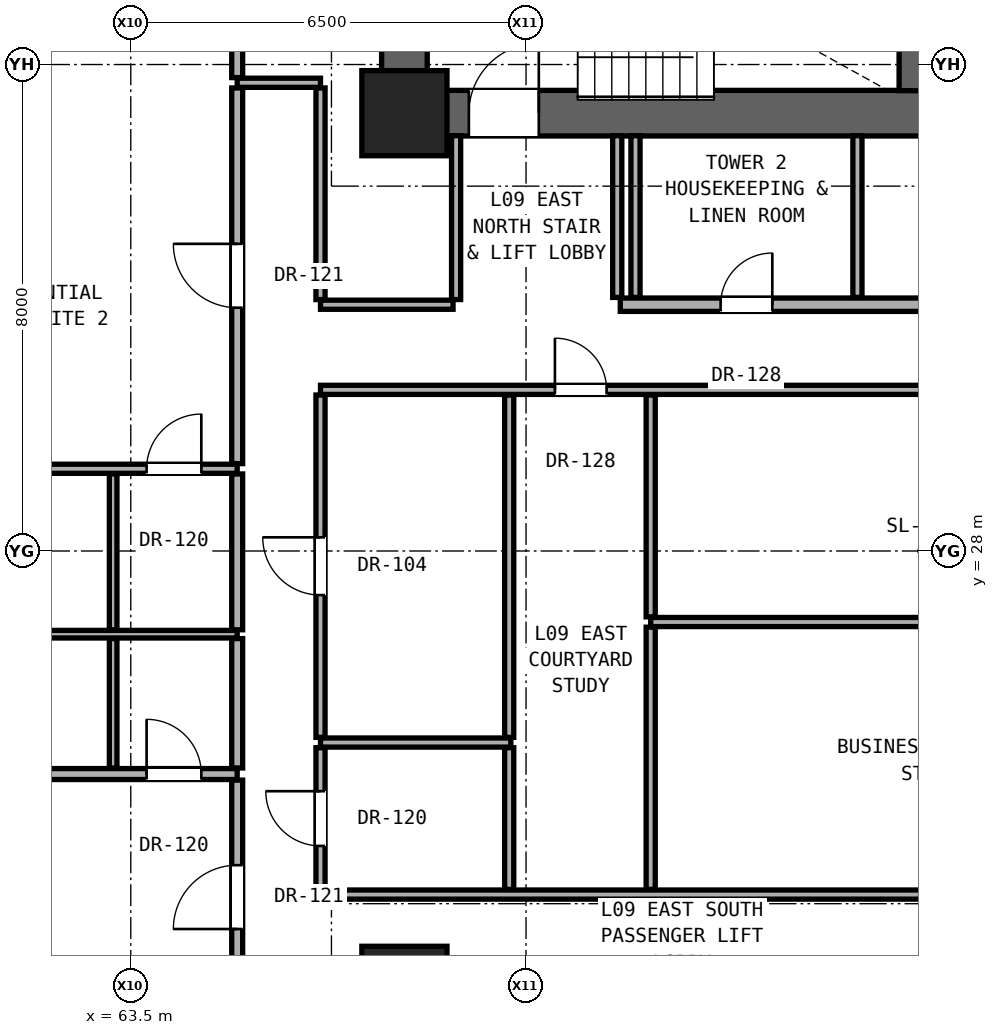
"""IFC4 building model, lengths in metres.
Left out: names, types, materials, properties, quantities, classifications, styles, units other than length and angle.
Written with IfcOpenShell. Run it as: python <this file> out.ifc"""

import sys

from ifc_helpers import new_model, si_unit, direction, frame, frame_2d, origin, origin_2d, place, context, subcontext, project, spatial, rectangle, extrude, element, fill, save


model = new_model("IFC4")
c1 = context("Model", 3, precision=1e-05, world=origin(), true_north=direction((0.0, 1.0)))
c2 = subcontext(c1, "Body", "Model", "MODEL_VIEW")
j1 = project(units=[si_unit("LENGTHUNIT", "METRE"), si_unit("PLANEANGLEUNIT", "RADIAN")], contexts=[c1])
p1 = place(None, origin())
s1 = spatial("IfcSite", under=j1, at=p1, CompositionType="ELEMENT")
p2 = place(p1, origin())
s2 = spatial("IfcBuilding", under=s1, at=p2, CompositionType="ELEMENT")
p3 = place(p2, frame((0.0, 0.0, 35.6)))
s3 = spatial("IfcBuildingStorey", under=s2, at=p3, CompositionType="ELEMENT", Elevation=35.6)
for number, where, z_axis, x_axis in (
    (1, (68.0, 20.8, 0.0), (0.0, 0.0, 1.0), (1.0, 0.0, 0.0)),
    (2, (68.0, 35.2, 0.0), (0.0, 0.0, 1.0), (1.0, 0.0, 0.0)),
):
    element("IfcColumn", number, at=place(p3, frame(where, z_axis=z_axis, x_axis=x_axis)), inside=s3, PredefinedType="COLUMN", context=c2, shape_type="SweptSolid", body=[
        extrude(rectangle(XDim=1.4, YDim=1.4, at=origin_2d()), origin(), (0.0, 0.0, 1.0), 3.3),
    ])
p4 = place(p3, frame((68.0, 35.2, 0.0), z_axis=(0.0, 0.0, 1.0), x_axis=(0.0, 1.0, 0.0)))
e3 = element("IfcWall", 3, at=p4, inside=s3, PredefinedType="SHEAR", context=c2, shape_type="SweptSolid", body=[
    extrude(rectangle(XDim=5.6, YDim=0.75, at=frame_2d((2.8, 0.0))), origin(), (0.0, 0.0, 1.0), 3.06),
])
p5 = place(p3, frame((68.0, 35.2, 0.0), z_axis=(0.0, 0.0, 1.0), x_axis=(1.0, 0.0, 0.0)))
e4 = element("IfcWall", 4, at=p5, inside=s3, PredefinedType="SHEAR", context=c2, shape_type="SweptSolid", body=[
    extrude(rectangle(XDim=17.0, YDim=0.75, at=frame_2d((8.5, 0.0))), origin(), (0.0, 0.0, 1.0), 3.06),
])
p6 = place(p5, frame((1.06, 0.0, 0.0)))
e5 = element("IfcOpeningElement", 5, at=p6, cuts=e4, PredefinedType="OPENING", context=c2, shape_type="SweptSolid", body=[
    extrude(rectangle(XDim=1.15, YDim=2.2, at=frame_2d((0.575, 1.1))), frame((0.0, 0.385, 0.0), z_axis=(0.0, -1.0, 0.0), x_axis=(1.0, 0.0, 0.0)), (0.0, 0.0, 1.0), 0.77),
])
p7 = place(p5, frame((8.75, 0.0, 0.0)))
e6 = element("IfcOpeningElement", 6, at=p7, cuts=e4, PredefinedType="OPENING", context=c2, shape_type="SweptSolid", body=[
    extrude(rectangle(XDim=1.4, YDim=2.35, at=frame_2d((0.7, 1.175))), frame((0.0, 0.385, 0.0), z_axis=(0.0, -1.0, 0.0), x_axis=(1.0, 0.0, 0.0)), (0.0, 0.0, 1.0), 0.77),
])
p8 = place(p5, frame((10.77, 0.0, 0.0)))
e7 = element("IfcOpeningElement", 7, at=p8, cuts=e4, PredefinedType="OPENING", context=c2, shape_type="SweptSolid", body=[
    extrude(rectangle(XDim=1.3, YDim=2.3, at=frame_2d((0.65, 1.15))), frame((0.0, 0.385, 0.0), z_axis=(0.0, -1.0, 0.0), x_axis=(1.0, 0.0, 0.0)), (0.0, 0.0, 1.0), 0.77),
])
p9 = place(p5, frame((12.69, 0.0, 0.0)))
e8 = element("IfcOpeningElement", 8, at=p9, cuts=e4, PredefinedType="OPENING", context=c2, shape_type="SweptSolid", body=[
    extrude(rectangle(XDim=1.3, YDim=2.3, at=frame_2d((0.65, 1.15))), frame((0.0, 0.385, 0.0), z_axis=(0.0, -1.0, 0.0), x_axis=(1.0, 0.0, 0.0)), (0.0, 0.0, 1.0), 0.77),
])
p10 = place(p5, frame((14.57, 0.0, 0.0)))
e9 = element("IfcOpeningElement", 9, at=p10, cuts=e4, PredefinedType="OPENING", context=c2, shape_type="SweptSolid", body=[
    extrude(rectangle(XDim=1.3, YDim=2.3, at=frame_2d((0.65, 1.15))), frame((0.0, 0.385, 0.0), z_axis=(0.0, -1.0, 0.0), x_axis=(1.0, 0.0, 0.0)), (0.0, 0.0, 1.0), 0.77),
])
p11 = place(p3, frame((66.62, 22.35, 0.0), z_axis=(0.0, 0.0, 1.0), x_axis=(1.0, 0.0, 0.0)))
e10 = element("IfcWall", 10, at=p11, inside=s3, PredefinedType="PARTITIONING", context=c2, shape_type="SweptSolid", body=[
    extrude(rectangle(XDim=19.63, YDim=0.15, at=frame_2d((9.815, 0.0))), origin(), (0.0, 0.0, 1.0), 2.125),
])
p12 = place(p11, frame((12.085, 0.0, 0.0)))
e11 = element("IfcOpeningElement", 11, at=p12, cuts=e10, PredefinedType="OPENING", context=c2, shape_type="SweptSolid", body=[
    extrude(rectangle(XDim=0.85, YDim=2.01, at=frame_2d((0.425, 1.005))), frame((0.0, 0.085, 0.0), z_axis=(0.0, -1.0, 0.0), x_axis=(1.0, 0.0, 0.0)), (0.0, 0.0, 1.0), 0.17),
])
p13 = place(p3, frame((57.768, 24.332, 0.0), z_axis=(0.0, 0.0, 1.0), x_axis=(1.0, 0.0, 0.0)))
e12 = element("IfcWall", 12, at=p13, inside=s3, PredefinedType="PARTITIONING", context=c2, shape_type="SweptSolid", body=[
    extrude(rectangle(XDim=7.482, YDim=0.18, at=frame_2d((3.741, 0.0))), origin(), (0.0, 0.0, 1.0), 2.196),
])
p14 = place(p13, frame((2.266, 0.0, 0.0)))
e13 = element("IfcOpeningElement", 13, at=p14, cuts=e12, PredefinedType="OPENING", context=c2, shape_type="SweptSolid", body=[
    extrude(rectangle(XDim=0.95, YDim=2.15, at=frame_2d((0.475, 1.075))), frame((0.0, 0.1, 0.0), z_axis=(0.0, -1.0, 0.0), x_axis=(1.0, 0.0, 0.0)), (0.0, 0.0, 1.0), 0.2),
])
p15 = place(p13, frame((5.992, 0.0, 0.0)))
e14 = element("IfcOpeningElement", 14, at=p15, cuts=e12, PredefinedType="OPENING", context=c2, shape_type="SweptSolid", body=[
    extrude(rectangle(XDim=0.9, YDim=2.1, at=frame_2d((0.45, 1.05))), frame((0.0, 0.1, 0.0), z_axis=(0.0, -1.0, 0.0), x_axis=(1.0, 0.0, 0.0)), (0.0, 0.0, 1.0), 0.2),
])
p16 = place(p3, frame((66.62, 24.85, 0.0), z_axis=(0.0, 0.0, 1.0), x_axis=(1.0, 0.0, 0.0)))
e15 = element("IfcWall", 15, at=p16, inside=s3, PredefinedType="PARTITIONING", context=c2, shape_type="SweptSolid", body=[
    extrude(rectangle(XDim=3.13, YDim=0.15, at=frame_2d((1.565, 0.0))), origin(), (0.0, 0.0, 1.0), 2.125),
])
p17 = place(p3, frame((57.768, 26.632, 0.0), z_axis=(0.0, 0.0, 1.0), x_axis=(1.0, 0.0, 0.0)))
e16 = element("IfcWall", 16, at=p17, inside=s3, PredefinedType="PARTITIONING", context=c2, shape_type="SweptSolid", body=[
    extrude(rectangle(XDim=7.482, YDim=0.125, at=frame_2d((3.741, 0.0))), origin(), (0.0, 0.0, 1.0), 2.196),
])
p18 = place(p3, frame((72.05, 26.832, 0.0), z_axis=(0.0, 0.0, 1.0), x_axis=(1.0, 0.0, 0.0)))
e17 = element("IfcWall", 17, at=p18, inside=s3, PredefinedType="PARTITIONING", context=c2, shape_type="SweptSolid", body=[
    extrude(rectangle(XDim=14.2, YDim=0.15, at=frame_2d((7.1, 0.0))), origin(), (0.0, 0.0, 1.0), 2.125),
])
p19 = place(p3, frame((57.768, 29.352, 0.0), z_axis=(0.0, 0.0, 1.0), x_axis=(1.0, 0.0, 0.0)))
e18 = element("IfcWall", 18, at=p19, inside=s3, PredefinedType="PARTITIONING", context=c2, shape_type="SweptSolid", body=[
    extrude(rectangle(XDim=7.482, YDim=0.15, at=frame_2d((3.741, 0.0))), origin(), (0.0, 0.0, 1.0), 2.196),
])
p20 = place(p19, frame((1.316, 0.0, 0.0)))
e19 = element("IfcOpeningElement", 19, at=p20, cuts=e18, PredefinedType="OPENING", context=c2, shape_type="SweptSolid", body=[
    extrude(rectangle(XDim=0.95, YDim=2.15, at=frame_2d((0.475, 1.075))), frame((0.0, 0.085, 0.0), z_axis=(0.0, -1.0, 0.0), x_axis=(1.0, 0.0, 0.0)), (0.0, 0.0, 1.0), 0.17),
])
p21 = place(p19, frame((5.992, 0.0, 0.0)))
e20 = element("IfcOpeningElement", 20, at=p21, cuts=e18, PredefinedType="OPENING", context=c2, shape_type="SweptSolid", body=[
    extrude(rectangle(XDim=0.9, YDim=2.1, at=frame_2d((0.45, 1.05))), frame((0.0, 0.085, 0.0), z_axis=(0.0, -1.0, 0.0), x_axis=(1.0, 0.0, 0.0)), (0.0, 0.0, 1.0), 0.17),
])
p22 = place(p3, frame((66.62, 30.65, 0.0), z_axis=(0.0, 0.0, 1.0), x_axis=(1.0, 0.0, 0.0)))
e21 = element("IfcWall", 21, at=p22, inside=s3, PredefinedType="PARTITIONING", context=c2, shape_type="SweptSolid", body=[
    extrude(rectangle(XDim=19.63, YDim=0.15, at=frame_2d((9.815, 0.0))), origin(), (0.0, 0.0, 1.0), 2.125),
])
p23 = place(p22, frame((3.855, 0.0, 0.0)))
e22 = element("IfcOpeningElement", 22, at=p23, cuts=e21, PredefinedType="OPENING", context=c2, shape_type="SweptSolid", body=[
    extrude(rectangle(XDim=0.85, YDim=2.01, at=frame_2d((0.425, 1.005))), frame((0.0, 0.085, 0.0), z_axis=(0.0, -1.0, 0.0), x_axis=(1.0, 0.0, 0.0)), (0.0, 0.0, 1.0), 0.17),
])
p24 = place(p22, frame((12.085, 0.0, 0.0)))
e23 = element("IfcOpeningElement", 23, at=p24, cuts=e21, PredefinedType="OPENING", context=c2, shape_type="SweptSolid", body=[
    extrude(rectangle(XDim=0.85, YDim=2.01, at=frame_2d((0.425, 1.005))), frame((0.0, 0.085, 0.0), z_axis=(0.0, -1.0, 0.0), x_axis=(1.0, 0.0, 0.0)), (0.0, 0.0, 1.0), 0.17),
])
p25 = place(p3, frame((66.62, 32.05, 0.0), z_axis=(0.0, 0.0, 1.0), x_axis=(1.0, 0.0, 0.0)))
e24 = element("IfcWall", 24, at=p25, inside=s3, PredefinedType="PARTITIONING", context=c2, shape_type="SweptSolid", body=[
    extrude(rectangle(XDim=2.18, YDim=0.15, at=frame_2d((1.09, 0.0))), origin(), (0.0, 0.0, 1.0), 2.125),
])
p26 = place(p3, frame((71.55, 32.05, 0.0), z_axis=(0.0, 0.0, 1.0), x_axis=(1.0, 0.0, 0.0)))
e25 = element("IfcWall", 25, at=p26, inside=s3, PredefinedType="SOLIDWALL", context=c2, shape_type="SweptSolid", body=[
    extrude(rectangle(XDim=14.7, YDim=0.22, at=frame_2d((7.35, 0.0))), origin(), (0.0, 0.0, 1.0), 2.125),
])
p27 = place(p26, frame((11.39, 0.0, 0.0)))
e26 = element("IfcOpeningElement", 26, at=p27, cuts=e25, PredefinedType="OPENING", context=c2, shape_type="SweptSolid", body=[
    extrude(rectangle(XDim=0.85, YDim=2.01, at=frame_2d((0.425, 1.005))), frame((0.0, 0.12, 0.0), z_axis=(0.0, -1.0, 0.0), x_axis=(1.0, 0.0, 0.0)), (0.0, 0.0, 1.0), 0.24),
])
p28 = place(p26, frame((6.065, 0.0, 0.0)))
e27 = element("IfcOpeningElement", 27, at=p28, cuts=e25, PredefinedType="OPENING", context=c2, shape_type="SweptSolid", body=[
    extrude(rectangle(XDim=0.85, YDim=2.01, at=frame_2d((0.425, 1.005))), frame((0.0, 0.12, 0.0), z_axis=(0.0, -1.0, 0.0), x_axis=(1.0, 0.0, 0.0)), (0.0, 0.0, 1.0), 0.24),
])
p29 = place(p26, frame((1.65, 0.0, 0.0)))
e28 = element("IfcOpeningElement", 28, at=p29, cuts=e25, PredefinedType="OPENING", context=c2, shape_type="SweptSolid", body=[
    extrude(rectangle(XDim=0.85, YDim=2.01, at=frame_2d((0.425, 1.005))), frame((0.0, 0.12, 0.0), z_axis=(0.0, -1.0, 0.0), x_axis=(1.0, 0.0, 0.0)), (0.0, 0.0, 1.0), 0.24),
])
p30 = place(p3, frame((65.25, 35.7, 0.0), z_axis=(0.0, 0.0, 1.0), x_axis=(1.0, 0.0, 0.0)))
e29 = element("IfcWall", 29, at=p30, inside=s3, PredefinedType="PARTITIONING", context=c2, shape_type="SweptSolid", body=[
    extrude(rectangle(XDim=1.37, YDim=0.15, at=frame_2d((0.685, 0.0))), origin(), (0.0, 0.0, 1.0), 3.06),
])
p31 = place(p3, frame((63.21, 24.432, 0.0), z_axis=(0.0, 0.0, 1.0), x_axis=(0.0, 1.0, 0.0)))
e30 = element("IfcWall", 30, at=p31, inside=s3, PredefinedType="PARTITIONING", context=c2, shape_type="SweptSolid", body=[
    extrude(rectangle(XDim=2.128, YDim=0.125, at=frame_2d((1.064, 0.0))), origin(), (0.0, 0.0, 1.0), 3.06),
])
p32 = place(p3, frame((63.21, 26.705, 0.0), z_axis=(0.0, 0.0, 1.0), x_axis=(0.0, 1.0, 0.0)))
e31 = element("IfcWall", 31, at=p32, inside=s3, PredefinedType="PARTITIONING", context=c2, shape_type="SweptSolid", body=[
    extrude(rectangle(XDim=2.562, YDim=0.125, at=frame_2d((1.281, 0.0))), origin(), (0.0, 0.0, 1.0), 2.279),
])
p33 = place(p3, frame((65.25, 20.385, 0.0), z_axis=(0.0, 0.0, 1.0), x_axis=(0.0, 1.0, 0.0)))
e32 = element("IfcWall", 32, at=p33, inside=s3, PredefinedType="PARTITIONING", context=c2, shape_type="SweptSolid", body=[
    extrude(rectangle(XDim=3.847, YDim=0.18, at=frame_2d((1.923, 0.0))), origin(), (0.0, 0.0, 1.0), 2.452),
])
p34 = place(p33, frame((1.398, 0.0, 0.0)))
e33 = element("IfcOpeningElement", 33, at=p34, cuts=e32, PredefinedType="OPENING", context=c2, shape_type="SweptSolid", body=[
    extrude(rectangle(XDim=1.05, YDim=2.2, at=frame_2d((0.525, 1.1))), frame((0.0, 0.1, 0.0), z_axis=(0.0, -1.0, 0.0), x_axis=(1.0, 0.0, 0.0)), (0.0, 0.0, 1.0), 0.2),
])
p35 = place(p3, frame((65.25, 24.432, 0.0), z_axis=(0.0, 0.0, 1.0), x_axis=(0.0, 1.0, 0.0)))
e34 = element("IfcWall", 34, at=p35, inside=s3, PredefinedType="PARTITIONING", context=c2, shape_type="SweptSolid", body=[
    extrude(rectangle(XDim=2.128, YDim=0.18, at=frame_2d((1.064, 0.0))), origin(), (0.0, 0.0, 1.0), 3.06),
])
p36 = place(p3, frame((65.25, 26.705, 0.0), z_axis=(0.0, 0.0, 1.0), x_axis=(0.0, 1.0, 0.0)))
e35 = element("IfcWall", 35, at=p36, inside=s3, PredefinedType="PARTITIONING", context=c2, shape_type="SweptSolid", body=[
    extrude(rectangle(XDim=2.562, YDim=0.18, at=frame_2d((1.281, 0.0))), origin(), (0.0, 0.0, 1.0), 2.279),
])
p37 = place(p3, frame((65.25, 29.437, 0.0), z_axis=(0.0, 0.0, 1.0), x_axis=(0.0, 1.0, 0.0)))
e36 = element("IfcWall", 36, at=p37, inside=s3, PredefinedType="PARTITIONING", context=c2, shape_type="SweptSolid", body=[
    extrude(rectangle(XDim=6.178, YDim=0.18, at=frame_2d((3.089, 0.0))), origin(), (0.0, 0.0, 1.0), 2.452),
])
p38 = place(p37, frame((2.564, 0.0, 0.0)))
e37 = element("IfcOpeningElement", 37, at=p38, cuts=e36, PredefinedType="OPENING", context=c2, shape_type="SweptSolid", body=[
    extrude(rectangle(XDim=1.05, YDim=2.2, at=frame_2d((0.525, 1.1))), frame((0.0, 0.1, 0.0), z_axis=(0.0, -1.0, 0.0), x_axis=(1.0, 0.0, 0.0)), (0.0, 0.0, 1.0), 0.2),
])
p39 = place(p3, frame((65.25, 35.785, 0.0), z_axis=(0.0, 0.0, 1.0), x_axis=(0.0, 1.0, 0.0)))
e38 = element("IfcWall", 38, at=p39, inside=s3, PredefinedType="PARTITIONING", context=c2, shape_type="SweptSolid", body=[
    extrude(rectangle(XDim=3.863, YDim=0.18, at=frame_2d((1.932, 0.0))), origin(), (0.0, 0.0, 1.0), 2.436),
])
p40 = place(p3, frame((66.62, 22.435, 0.0), z_axis=(0.0, 0.0, 1.0), x_axis=(0.0, 1.0, 0.0)))
e39 = element("IfcWall", 39, at=p40, inside=s3, PredefinedType="PARTITIONING", context=c2, shape_type="SweptSolid", body=[
    extrude(rectangle(XDim=2.33, YDim=0.15, at=frame_2d((1.165, 0.0))), origin(), (0.0, 0.0, 1.0), 3.06),
])
p41 = place(p40, frame((0.715, 0.0, 0.0)))
e40 = element("IfcOpeningElement", 40, at=p41, cuts=e39, PredefinedType="OPENING", context=c2, shape_type="SweptSolid", body=[
    extrude(rectangle(XDim=0.9, YDim=2.1, at=frame_2d((0.45, 1.05))), frame((0.0, 0.085, 0.0), z_axis=(0.0, -1.0, 0.0), x_axis=(1.0, 0.0, 0.0)), (0.0, 0.0, 1.0), 0.17),
])
p42 = place(p3, frame((66.62, 24.935, 0.0), z_axis=(0.0, 0.0, 1.0), x_axis=(0.0, 1.0, 0.0)))
e41 = element("IfcWall", 41, at=p42, inside=s3, PredefinedType="PARTITIONING", context=c2, shape_type="SweptSolid", body=[
    extrude(rectangle(XDim=5.63, YDim=0.15, at=frame_2d((2.815, 0.0))), origin(), (0.0, 0.0, 1.0), 2.279),
])
p43 = place(p42, frame((2.34, 0.0, 0.0)))
e42 = element("IfcOpeningElement", 42, at=p43, cuts=e41, PredefinedType="OPENING", context=c2, shape_type="SweptSolid", body=[
    extrude(rectangle(XDim=0.95, YDim=2.15, at=frame_2d((0.475, 1.075))), frame((0.0, 0.085, 0.0), z_axis=(0.0, -1.0, 0.0), x_axis=(1.0, 0.0, 0.0)), (0.0, 0.0, 1.0), 0.17),
])
p44 = place(p3, frame((66.62, 32.135, 0.0), z_axis=(0.0, 0.0, 1.0), x_axis=(0.0, 1.0, 0.0)))
e43 = element("IfcWall", 43, at=p44, inside=s3, PredefinedType="PARTITIONING", context=c2, shape_type="SweptSolid", body=[
    extrude(rectangle(XDim=3.48, YDim=0.15, at=frame_2d((1.74, 0.0))), origin(), (0.0, 0.0, 1.0), 2.452),
])
p45 = place(p3, frame((68.85, 32.135, 0.0), z_axis=(0.0, 0.0, 1.0), x_axis=(0.0, 1.0, 0.0)))
e44 = element("IfcWall", 44, at=p45, inside=s3, PredefinedType="PARTITIONING", context=c2, shape_type="SweptSolid", body=[
    extrude(rectangle(XDim=2.695, YDim=0.15, at=frame_2d((1.348, 0.0))), origin(), (0.0, 0.0, 1.0), 3.06),
])
p46 = place(p3, frame((69.723, 22.435, 0.0), z_axis=(0.0, 0.0, 1.0), x_axis=(0.0, 1.0, 0.0)))
e45 = element("IfcWall", 45, at=p46, inside=s3, PredefinedType="PARTITIONING", context=c2, shape_type="SweptSolid", body=[
    extrude(rectangle(XDim=2.33, YDim=0.15, at=frame_2d((1.165, 0.0))), origin(), (0.0, 0.0, 1.0), 3.06),
])
p47 = place(p3, frame((69.723, 24.935, 0.0), z_axis=(0.0, 0.0, 1.0), x_axis=(0.0, 1.0, 0.0)))
e46 = element("IfcWall", 46, at=p47, inside=s3, PredefinedType="PARTITIONING", context=c2, shape_type="SweptSolid", body=[
    extrude(rectangle(XDim=5.63, YDim=0.15, at=frame_2d((2.815, 0.0))), origin(), (0.0, 0.0, 1.0), 2.125),
])
for number, where, z_axis, x_axis in (
    (47, (71.5, 32.17, 0.0), (0.0, 0.0, 1.0), (0.0, 1.0, 0.0)),
    (48, (71.8, 32.17, 0.0), (0.0, 0.0, 1.0), (0.0, 1.0, 0.0)),
):
    element("IfcWall", number, at=place(p3, frame(where, z_axis=z_axis, x_axis=x_axis)), inside=s3, PredefinedType="PARTITIONING", context=c2, shape_type="SweptSolid", body=[
        extrude(rectangle(XDim=2.66, YDim=0.15, at=frame_2d((1.33, 0.0))), origin(), (0.0, 0.0, 1.0), 3.06),
    ])
p48 = place(p3, frame((72.05, 22.435, 0.0), z_axis=(0.0, 0.0, 1.0), x_axis=(0.0, 1.0, 0.0)))
e49 = element("IfcWall", 49, at=p48, inside=s3, PredefinedType="PARTITIONING", context=c2, shape_type="SweptSolid", body=[
    extrude(rectangle(XDim=4.312, YDim=0.15, at=frame_2d((2.156, 0.0))), origin(), (0.0, 0.0, 1.0), 2.589),
])
p49 = place(p3, frame((72.05, 26.917, 0.0), z_axis=(0.0, 0.0, 1.0), x_axis=(0.0, 1.0, 0.0)))
e50 = element("IfcWall", 50, at=p49, inside=s3, PredefinedType="PARTITIONING", context=c2, shape_type="SweptSolid", body=[
    extrude(rectangle(XDim=3.648, YDim=0.15, at=frame_2d((1.824, 0.0))), origin(), (0.0, 0.0, 1.0), 2.125),
])
p50 = place(p3, frame((75.45, 32.17, 0.0), z_axis=(0.0, 0.0, 1.0), x_axis=(0.0, 1.0, 0.0)))
e51 = element("IfcWall", 51, at=p50, inside=s3, PredefinedType="PARTITIONING", context=c2, shape_type="SweptSolid", body=[
    extrude(rectangle(XDim=2.66, YDim=0.15, at=frame_2d((1.33, 0.0))), origin(), (0.0, 0.0, 1.0), 3.06),
])
p51 = place(p3, frame((76.36, 35.57, 0.0), z_axis=(0.0, 0.0, 1.0), x_axis=(0.0, 1.0, 0.0)))
e52 = element("IfcWall", 52, at=p51, inside=s3, PredefinedType="SHEAR", context=c2, shape_type="SweptSolid", body=[
    extrude(rectangle(XDim=2.695, YDim=0.45, at=frame_2d((1.347, 0.0))), origin(), (0.0, 0.0, 1.0), 3.06),
])
p52 = place(p6, origin())
e53 = element("IfcDoor", 53, at=p52, inside=s3, OperationType="SINGLE_SWING_RIGHT", PredefinedType="DOOR", context=c2, shape_type="SweptSolid", body=[
    extrude(rectangle(XDim=1.15, YDim=2.2, at=frame_2d((0.575, 1.1))), frame((0.0, 0.025, 0.0), z_axis=(0.0, -1.0, 0.0), x_axis=(1.0, 0.0, 0.0)), (0.0, 0.0, 1.0), 0.05),
])
fill(e5, e53)
p53 = place(p29, origin())
e54 = element("IfcDoor", 54, at=p53, inside=s3, OperationType="SINGLE_SWING_RIGHT", PredefinedType="DOOR", context=c2, shape_type="SweptSolid", body=[
    extrude(rectangle(XDim=0.85, YDim=2.01, at=frame_2d((0.425, 1.005))), frame((0.0, 0.025, 0.0), z_axis=(0.0, -1.0, 0.0), x_axis=(1.0, 0.0, 0.0)), (0.0, 0.0, 1.0), 0.05),
])
fill(e28, e54)
p54 = place(p41, origin())
e55 = element("IfcDoor", 55, at=p54, inside=s3, OperationType="SINGLE_SWING_RIGHT", PredefinedType="DOOR", context=c2, shape_type="SweptSolid", body=[
    extrude(rectangle(XDim=0.9, YDim=2.1, at=frame_2d((0.45, 1.05))), frame((0.0, 0.025, 0.0), z_axis=(0.0, -1.0, 0.0), x_axis=(1.0, 0.0, 0.0)), (0.0, 0.0, 1.0), 0.05),
])
fill(e40, e55)
p55 = place(p34, origin())
e56 = element("IfcDoor", 56, at=p55, inside=s3, OperationType="SINGLE_SWING_LEFT", PredefinedType="DOOR", context=c2, shape_type="SweptSolid", body=[
    extrude(rectangle(XDim=1.05, YDim=2.2, at=frame_2d((0.525, 1.1))), frame((0.0, 0.025, 0.0), z_axis=(0.0, -1.0, 0.0), x_axis=(1.0, 0.0, 0.0)), (0.0, 0.0, 1.0), 0.05),
])
fill(e33, e56)
p56 = place(p15, origin())
e57 = element("IfcDoor", 57, at=p56, inside=s3, OperationType="SINGLE_SWING_LEFT", PredefinedType="DOOR", context=c2, shape_type="SweptSolid", body=[
    extrude(rectangle(XDim=0.9, YDim=2.1, at=frame_2d((0.45, 1.05))), frame((0.0, 0.025, 0.0), z_axis=(0.0, -1.0, 0.0), x_axis=(1.0, 0.0, 0.0)), (0.0, 0.0, 1.0), 0.05),
])
fill(e14, e57)
p57 = place(p38, origin())
e58 = element("IfcDoor", 58, at=p57, inside=s3, OperationType="SINGLE_SWING_RIGHT", PredefinedType="DOOR", context=c2, shape_type="SweptSolid", body=[
    extrude(rectangle(XDim=1.05, YDim=2.2, at=frame_2d((0.525, 1.1))), frame((0.0, 0.025, 0.0), z_axis=(0.0, -1.0, 0.0), x_axis=(1.0, 0.0, 0.0)), (0.0, 0.0, 1.0), 0.05),
])
fill(e37, e58)
p58 = place(p21, origin())
e59 = element("IfcDoor", 59, at=p58, inside=s3, OperationType="SINGLE_SWING_RIGHT", PredefinedType="DOOR", context=c2, shape_type="SweptSolid", body=[
    extrude(rectangle(XDim=0.9, YDim=2.1, at=frame_2d((0.45, 1.05))), frame((0.0, 0.025, 0.0), z_axis=(0.0, -1.0, 0.0), x_axis=(1.0, 0.0, 0.0)), (0.0, 0.0, 1.0), 0.05),
])
fill(e20, e59)
p59 = place(p43, origin())
e60 = element("IfcDoor", 60, at=p59, inside=s3, OperationType="SINGLE_SWING_RIGHT", PredefinedType="DOOR", context=c2, shape_type="SweptSolid", body=[
    extrude(rectangle(XDim=0.95, YDim=2.15, at=frame_2d((0.475, 1.075))), frame((0.0, 0.025, 0.0), z_axis=(0.0, -1.0, 0.0), x_axis=(1.0, 0.0, 0.0)), (0.0, 0.0, 1.0), 0.05),
])
fill(e42, e60)
p60 = place(p23, origin())
e61 = element("IfcDoor", 61, at=p60, inside=s3, OperationType="SINGLE_SWING_LEFT", PredefinedType="DOOR", context=c2, shape_type="SweptSolid", body=[
    extrude(rectangle(XDim=0.85, YDim=2.01, at=frame_2d((0.425, 1.005))), frame((0.0, 0.025, 0.0), z_axis=(0.0, -1.0, 0.0), x_axis=(1.0, 0.0, 0.0)), (0.0, 0.0, 1.0), 0.05),
])
fill(e22, e61)
save(model, sys.argv[1])
